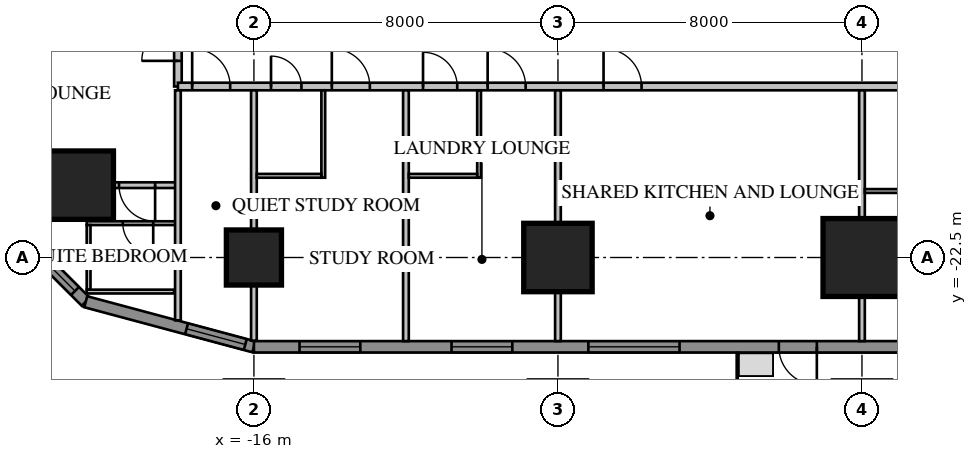
"""IFC4 building model, lengths in metres.
Left out: names, types, materials, properties, quantities, classifications, styles, units other than length and angle.
Written with IfcOpenShell. Run it as: python <this file> out.ifc"""

import sys

from ifc_helpers import new_model, si_unit, direction, frame, frame_2d, origin, origin_2d, place, context, subcontext, project, spatial, rectangle, extrude, element, fill, save


model = new_model("IFC4")
c1 = context("Model", 3, precision=1e-05, world=origin(), true_north=direction((0.0, 1.0)))
c2 = subcontext(c1, "Body", "Model", "MODEL_VIEW")
j1 = project(units=[si_unit("LENGTHUNIT", "METRE"), si_unit("PLANEANGLEUNIT", "RADIAN")], contexts=[c1])
p1 = place(None, origin())
s1 = spatial("IfcSite", under=j1, at=p1, CompositionType="ELEMENT")
p2 = place(p1, origin())
s2 = spatial("IfcBuilding", under=s1, at=p2, CompositionType="ELEMENT")
p3 = place(p2, frame((0.0, 0.0, 27.55)))
s3 = spatial("IfcBuildingStorey", under=s2, at=p3, CompositionType="ELEMENT", Elevation=27.55)
p4 = place(p3, frame((-20.596, -20.596, 0.0), z_axis=(0.0, 0.0, 1.0), x_axis=(1.0, 0.0, 0.0)))
e1 = element("IfcColumn", 1, at=p4, inside=s3, PredefinedType="COLUMN", context=c2, shape_type="SweptSolid", body=[
    extrude(rectangle(XDim=1.8, YDim=1.8, at=origin_2d()), origin(), (0.0, 0.0, 1.0), 3.85),
])
p5 = place(p3, frame((-16.0, -22.5, 0.0), z_axis=(0.0, 0.0, 1.0), x_axis=(1.0, 0.0, 0.0)))
e2 = element("IfcColumn", 2, at=p5, inside=s3, PredefinedType="COLUMN", context=c2, shape_type="SweptSolid", body=[
    extrude(rectangle(XDim=1.45, YDim=1.45, at=origin_2d()), origin(), (0.0, 0.0, 1.0), 3.85),
])
p6 = place(p3, frame((-8.0, -22.5, 0.0), z_axis=(0.0, 0.0, 1.0), x_axis=(1.0, 0.0, 0.0)))
e3 = element("IfcColumn", 3, at=p6, inside=s3, PredefinedType="COLUMN", context=c2, shape_type="SweptSolid", body=[
    extrude(rectangle(XDim=1.8, YDim=1.8, at=origin_2d()), origin(), (0.0, 0.0, 1.0), 3.85),
])
p7 = place(p3, frame((0.0, -22.5, 0.0), z_axis=(0.0, 0.0, 1.0), x_axis=(1.0, 0.0, 0.0)))
e4 = element("IfcColumn", 4, at=p7, inside=s3, PredefinedType="COLUMN", context=c2, shape_type="SweptSolid", body=[
    extrude(rectangle(XDim=2.05, YDim=2.05, at=origin_2d()), origin(), (0.0, 0.0, 1.0), 3.85),
])
p8 = place(p3, frame((-23.664, -20.425, 0.0), z_axis=(0.0, 0.0, 1.0), x_axis=(0.707106781187, -0.707106781187, 0.0)))
e5 = element("IfcWall", 5, at=p8, inside=s3, PredefinedType="SOLIDWALL", context=c2, shape_type="SweptSolid", body=[
    extrude(rectangle(XDim=4.581, YDim=0.3, at=frame_2d((2.291, 0.0))), origin(), (0.0, 0.0, 1.0), 3.65),
])
p9 = place(p8, frame((0.4, 0.0, 0.75)))
e6 = element("IfcOpeningElement", 6, at=p9, cuts=e5, PredefinedType="OPENING", context=c2, shape_type="SweptSolid", body=[
    extrude(rectangle(XDim=3.781, YDim=1.8, at=frame_2d((1.891, 0.9))), frame((0.0, 0.17, 0.0), z_axis=(0.0, -1.0, 0.0), x_axis=(1.0, 0.0, 0.0)), (0.0, 0.0, 1.0), 0.34),
])
p10 = place(p3, frame((-20.425, -23.664, 0.0), z_axis=(0.0, 0.0, 1.0), x_axis=(0.965920218567, -0.258839972501, 0.0)))
e7 = element("IfcWall", 7, at=p10, inside=s3, PredefinedType="SOLIDWALL", context=c2, shape_type="SweptSolid", body=[
    extrude(rectangle(XDim=4.581, YDim=0.3, at=frame_2d((2.291, 0.0))), origin(), (0.0, 0.0, 1.0), 3.65),
])
p11 = place(p10, frame((2.746, 0.0, 0.75)))
e8 = element("IfcOpeningElement", 8, at=p11, cuts=e7, PredefinedType="OPENING", context=c2, shape_type="SweptSolid", body=[
    extrude(rectangle(XDim=1.6, YDim=1.8, at=frame_2d((0.8, 0.9))), frame((0.0, 0.17, 0.0), z_axis=(0.0, -1.0, 0.0), x_axis=(1.0, 0.0, 0.0)), (0.0, 0.0, 1.0), 0.34),
])
p12 = place(p3, frame((-16.0, -24.85, 0.0), z_axis=(0.0, 0.0, 1.0), x_axis=(1.0, 0.0, 0.0)))
e9 = element("IfcWall", 9, at=p12, inside=s3, PredefinedType="SOLIDWALL", context=c2, shape_type="SweptSolid", body=[
    extrude(rectangle(XDim=32.0, YDim=0.3, at=frame_2d((16.0, 0.0))), origin(), (0.0, 0.0, 1.0), 3.65),
])
p13 = place(p12, frame((1.2, 0.0, 0.75)))
e10 = element("IfcOpeningElement", 10, at=p13, cuts=e9, PredefinedType="OPENING", context=c2, shape_type="SweptSolid", body=[
    extrude(rectangle(XDim=1.6, YDim=1.8, at=frame_2d((0.8, 0.9))), frame((0.0, 0.17, 0.0), z_axis=(0.0, -1.0, 0.0), x_axis=(1.0, 0.0, 0.0)), (0.0, 0.0, 1.0), 0.34),
])
p14 = place(p12, frame((5.2, 0.0, 0.75)))
e11 = element("IfcOpeningElement", 11, at=p14, cuts=e9, PredefinedType="OPENING", context=c2, shape_type="SweptSolid", body=[
    extrude(rectangle(XDim=1.6, YDim=1.8, at=frame_2d((0.8, 0.9))), frame((0.0, 0.17, 0.0), z_axis=(0.0, -1.0, 0.0), x_axis=(1.0, 0.0, 0.0)), (0.0, 0.0, 1.0), 0.34),
])
p15 = place(p12, frame((17.2, 0.0, 0.75)))
e12 = element("IfcOpeningElement", 12, at=p15, cuts=e9, PredefinedType="OPENING", context=c2, shape_type="SweptSolid", body=[
    extrude(rectangle(XDim=1.6, YDim=1.8, at=frame_2d((0.8, 0.9))), frame((0.0, 0.17, 0.0), z_axis=(0.0, -1.0, 0.0), x_axis=(1.0, 0.0, 0.0)), (0.0, 0.0, 1.0), 0.34),
])
p16 = place(p12, frame((21.2, 0.0, 0.75)))
e13 = element("IfcOpeningElement", 13, at=p16, cuts=e9, PredefinedType="OPENING", context=c2, shape_type="SweptSolid", body=[
    extrude(rectangle(XDim=1.6, YDim=1.8, at=frame_2d((0.8, 0.9))), frame((0.0, 0.17, 0.0), z_axis=(0.0, -1.0, 0.0), x_axis=(1.0, 0.0, 0.0)), (0.0, 0.0, 1.0), 0.34),
])
p17 = place(p12, frame((25.2, 0.0, 0.75)))
e14 = element("IfcOpeningElement", 14, at=p17, cuts=e9, PredefinedType="OPENING", context=c2, shape_type="SweptSolid", body=[
    extrude(rectangle(XDim=1.6, YDim=1.8, at=frame_2d((0.8, 0.9))), frame((0.0, 0.17, 0.0), z_axis=(0.0, -1.0, 0.0), x_axis=(1.0, 0.0, 0.0)), (0.0, 0.0, 1.0), 0.34),
])
p18 = place(p12, frame((29.2, 0.0, 0.75)))
e15 = element("IfcOpeningElement", 15, at=p18, cuts=e9, PredefinedType="OPENING", context=c2, shape_type="SweptSolid", body=[
    extrude(rectangle(XDim=1.6, YDim=1.8, at=frame_2d((0.8, 0.9))), frame((0.0, 0.17, 0.0), z_axis=(0.0, -1.0, 0.0), x_axis=(1.0, 0.0, 0.0)), (0.0, 0.0, 1.0), 0.34),
])
p19 = place(p12, frame((8.8, 0.0, 0.75)))
e16 = element("IfcOpeningElement", 16, at=p19, cuts=e9, PredefinedType="OPENING", context=c2, shape_type="SweptSolid", body=[
    extrude(rectangle(XDim=2.4, YDim=1.8, at=frame_2d((1.2, 0.9))), frame((0.0, 0.17, 0.0), z_axis=(0.0, -1.0, 0.0), x_axis=(1.0, 0.0, 0.0)), (0.0, 0.0, 1.0), 0.34),
])
p20 = place(p12, frame((13.812, 0.0, 0.0)))
e17 = element("IfcOpeningElement", 17, at=p20, cuts=e9, PredefinedType="OPENING", context=c2, shape_type="SweptSolid", body=[
    extrude(rectangle(XDim=1.0, YDim=2.4, at=frame_2d((0.5, 1.2))), frame((0.0, 0.17, 0.0), z_axis=(0.0, -1.0, 0.0), x_axis=(1.0, 0.0, 0.0)), (0.0, 0.0, 1.0), 0.34),
])
p21 = place(p3, frame((-18.0, 18.0, 0.0), z_axis=(0.0, 0.0, 1.0), x_axis=(0.0, -1.0, 0.0)))
e18 = element("IfcWall", 18, at=p21, inside=s3, PredefinedType="PARTITIONING", context=c2, shape_type="SweptSolid", body=[
    extrude(rectangle(XDim=36.0, YDim=0.2, at=frame_2d((18.0, 0.0))), origin(), (0.0, 0.0, 1.0), 3.65),
])
p22 = place(p21, frame((10.4, 0.0, 0.0)))
e19 = element("IfcOpeningElement", 19, at=p22, cuts=e18, PredefinedType="OPENING", context=c2, shape_type="SweptSolid", body=[
    extrude(rectangle(XDim=1.0, YDim=2.1, at=frame_2d((0.5, 1.05))), frame((0.0, 0.12, 0.0), z_axis=(0.0, -1.0, 0.0), x_axis=(1.0, 0.0, 0.0)), (0.0, 0.0, 1.0), 0.24),
])
p23 = place(p21, frame((14.4, 0.0, 0.0)))
e20 = element("IfcOpeningElement", 20, at=p23, cuts=e18, PredefinedType="OPENING", context=c2, shape_type="SweptSolid", body=[
    extrude(rectangle(XDim=1.0, YDim=2.1, at=frame_2d((0.5, 1.05))), frame((0.0, 0.12, 0.0), z_axis=(0.0, -1.0, 0.0), x_axis=(1.0, 0.0, 0.0)), (0.0, 0.0, 1.0), 0.24),
])
p24 = place(p21, frame((0.375, 0.0, 0.0)))
e21 = element("IfcOpeningElement", 21, at=p24, cuts=e18, PredefinedType="OPENING", context=c2, shape_type="SweptSolid", body=[
    extrude(rectangle(XDim=1.0, YDim=2.1, at=frame_2d((0.5, 1.05))), frame((0.0, 0.12, 0.0), z_axis=(0.0, -1.0, 0.0), x_axis=(1.0, 0.0, 0.0)), (0.0, 0.0, 1.0), 0.24),
])
p25 = place(p21, frame((34.375, 0.0, 0.0)))
e22 = element("IfcOpeningElement", 22, at=p25, cuts=e18, PredefinedType="OPENING", context=c2, shape_type="SweptSolid", body=[
    extrude(rectangle(XDim=0.95, YDim=2.1, at=frame_2d((0.475, 1.05))), frame((0.0, 0.12, 0.0), z_axis=(0.0, -1.0, 0.0), x_axis=(1.0, 0.0, 0.0)), (0.0, 0.0, 1.0), 0.24),
])
p26 = place(p3, frame((-18.065, -21.596, 0.0), z_axis=(0.0, 0.0, 1.0), x_axis=(-1.0, 0.0, 0.0)))
e23 = element("IfcWall", 23, at=p26, inside=s3, PredefinedType="PARTITIONING", context=c2, shape_type="SweptSolid", body=[
    extrude(rectangle(XDim=2.335, YDim=0.1, at=frame_2d((1.167, 0.0))), origin(), (0.0, 0.0, 1.0), 3.65),
])
p27 = place(p26, frame((0.585, 0.0, 0.0)))
e24 = element("IfcOpeningElement", 24, at=p27, cuts=e23, PredefinedType="OPENING", context=c2, shape_type="SweptSolid", body=[
    extrude(rectangle(XDim=0.8, YDim=2.1, at=frame_2d((0.4, 1.05))), frame((0.0, 0.07, 0.0), z_axis=(0.0, -1.0, 0.0), x_axis=(1.0, 0.0, 0.0)), (0.0, 0.0, 1.0), 0.14),
])
p28 = place(p3, frame((-20.35, -21.646, 0.0), z_axis=(0.0, 0.0, 1.0), x_axis=(0.0, -1.0, 0.0)))
e25 = element("IfcWall", 25, at=p28, inside=s3, PredefinedType="PARTITIONING", context=c2, shape_type="SweptSolid", body=[
    extrude(rectangle(XDim=1.7, YDim=0.1, at=frame_2d((0.85, 0.0))), origin(), (0.0, 0.0, 1.0), 3.65),
])
p29 = place(p3, frame((-18.1, -23.396, 0.0), z_axis=(0.0, 0.0, 1.0), x_axis=(-1.0, 0.0, 0.0)))
e26 = element("IfcWall", 26, at=p29, inside=s3, PredefinedType="PARTITIONING", context=c2, shape_type="SweptSolid", body=[
    extrude(rectangle(XDim=2.3, YDim=0.1, at=frame_2d((1.15, 0.0))), origin(), (0.0, 0.0, 1.0), 3.65),
])
p30 = place(p3, frame((-18.065, -20.596, 0.0), z_axis=(0.0, 0.0, 1.0), x_axis=(-1.0, 0.0, 0.0)))
e27 = element("IfcWall", 27, at=p30, inside=s3, PredefinedType="PARTITIONING", context=c2, shape_type="SweptSolid", body=[
    extrude(rectangle(XDim=5.209, YDim=0.15, at=frame_2d((2.604, 0.0))), origin(), (0.0, 0.0, 1.0), 3.65),
])
p31 = place(p30, frame((0.535, 0.0, 0.0)))
e28 = element("IfcOpeningElement", 28, at=p31, cuts=e27, PredefinedType="OPENING", context=c2, shape_type="SweptSolid", body=[
    extrude(rectangle(XDim=0.95, YDim=2.1, at=frame_2d((0.475, 1.05))), frame((0.0, 0.095, 0.0), z_axis=(0.0, -1.0, 0.0), x_axis=(1.0, 0.0, 0.0)), (0.0, 0.0, 1.0), 0.19),
])
p32 = place(p3, frame((-18.0, -18.0, 0.0), z_axis=(0.0, 0.0, 1.0), x_axis=(1.0, 0.0, 0.0)))
e29 = element("IfcWall", 29, at=p32, inside=s3, PredefinedType="PARTITIONING", context=c2, shape_type="SweptSolid", body=[
    extrude(rectangle(XDim=36.0, YDim=0.2, at=frame_2d((18.0, 0.0))), origin(), (0.0, 0.0, 1.0), 3.65),
])
p33 = place(p32, frame((0.375, 0.0, 0.0)))
e30 = element("IfcOpeningElement", 30, at=p33, cuts=e29, PredefinedType="OPENING", context=c2, shape_type="SweptSolid", body=[
    extrude(rectangle(XDim=1.0, YDim=2.1, at=frame_2d((0.5, 1.05))), frame((0.0, 0.12, 0.0), z_axis=(0.0, -1.0, 0.0), x_axis=(1.0, 0.0, 0.0)), (0.0, 0.0, 1.0), 0.24),
])
p34 = place(p32, frame((2.45, 0.0, 0.0)))
e31 = element("IfcOpeningElement", 31, at=p34, cuts=e29, PredefinedType="OPENING", context=c2, shape_type="SweptSolid", body=[
    extrude(rectangle(XDim=0.8, YDim=2.1, at=frame_2d((0.4, 1.05))), frame((0.0, 0.12, 0.0), z_axis=(0.0, -1.0, 0.0), x_axis=(1.0, 0.0, 0.0)), (0.0, 0.0, 1.0), 0.24),
])
p35 = place(p32, frame((4.05, 0.0, 0.0)))
e32 = element("IfcOpeningElement", 32, at=p35, cuts=e29, PredefinedType="OPENING", context=c2, shape_type="SweptSolid", body=[
    extrude(rectangle(XDim=1.0, YDim=2.1, at=frame_2d((0.5, 1.05))), frame((0.0, 0.12, 0.0), z_axis=(0.0, -1.0, 0.0), x_axis=(1.0, 0.0, 0.0)), (0.0, 0.0, 1.0), 0.24),
])
p36 = place(p32, frame((6.45, 0.0, 0.0)))
e33 = element("IfcOpeningElement", 33, at=p36, cuts=e29, PredefinedType="OPENING", context=c2, shape_type="SweptSolid", body=[
    extrude(rectangle(XDim=0.9, YDim=2.1, at=frame_2d((0.45, 1.05))), frame((0.0, 0.12, 0.0), z_axis=(0.0, -1.0, 0.0), x_axis=(1.0, 0.0, 0.0)), (0.0, 0.0, 1.0), 0.24),
])
p37 = place(p32, frame((8.15, 0.0, 0.0)))
e34 = element("IfcOpeningElement", 34, at=p37, cuts=e29, PredefinedType="OPENING", context=c2, shape_type="SweptSolid", body=[
    extrude(rectangle(XDim=1.0, YDim=2.1, at=frame_2d((0.5, 1.05))), frame((0.0, 0.12, 0.0), z_axis=(0.0, -1.0, 0.0), x_axis=(1.0, 0.0, 0.0)), (0.0, 0.0, 1.0), 0.24),
])
p38 = place(p32, frame((19.8, 0.0, 0.0)))
e35 = element("IfcOpeningElement", 35, at=p38, cuts=e29, PredefinedType="OPENING", context=c2, shape_type="SweptSolid", body=[
    extrude(rectangle(XDim=0.95, YDim=2.1, at=frame_2d((0.475, 1.05))), frame((0.0, 0.12, 0.0), z_axis=(0.0, -1.0, 0.0), x_axis=(1.0, 0.0, 0.0)), (0.0, 0.0, 1.0), 0.24),
])
p39 = place(p32, frame((23.8, 0.0, 0.0)))
e36 = element("IfcOpeningElement", 36, at=p39, cuts=e29, PredefinedType="OPENING", context=c2, shape_type="SweptSolid", body=[
    extrude(rectangle(XDim=0.95, YDim=2.1, at=frame_2d((0.475, 1.05))), frame((0.0, 0.12, 0.0), z_axis=(0.0, -1.0, 0.0), x_axis=(1.0, 0.0, 0.0)), (0.0, 0.0, 1.0), 0.24),
])
p40 = place(p32, frame((27.8, 0.0, 0.0)))
e37 = element("IfcOpeningElement", 37, at=p40, cuts=e29, PredefinedType="OPENING", context=c2, shape_type="SweptSolid", body=[
    extrude(rectangle(XDim=0.95, YDim=2.1, at=frame_2d((0.475, 1.05))), frame((0.0, 0.12, 0.0), z_axis=(0.0, -1.0, 0.0), x_axis=(1.0, 0.0, 0.0)), (0.0, 0.0, 1.0), 0.24),
])
p41 = place(p32, frame((31.8, 0.0, 0.0)))
e38 = element("IfcOpeningElement", 38, at=p41, cuts=e29, PredefinedType="OPENING", context=c2, shape_type="SweptSolid", body=[
    extrude(rectangle(XDim=0.95, YDim=2.1, at=frame_2d((0.475, 1.05))), frame((0.0, 0.12, 0.0), z_axis=(0.0, -1.0, 0.0), x_axis=(1.0, 0.0, 0.0)), (0.0, 0.0, 1.0), 0.24),
])
p42 = place(p32, frame((34.375, 0.0, 0.0)))
e39 = element("IfcOpeningElement", 39, at=p42, cuts=e29, PredefinedType="OPENING", context=c2, shape_type="SweptSolid", body=[
    extrude(rectangle(XDim=0.95, YDim=2.1, at=frame_2d((0.475, 1.05))), frame((0.0, 0.12, 0.0), z_axis=(0.0, -1.0, 0.0), x_axis=(1.0, 0.0, 0.0)), (0.0, 0.0, 1.0), 0.24),
])
p43 = place(p32, frame((11.2, 0.0, 0.0)))
e40 = element("IfcOpeningElement", 40, at=p43, cuts=e29, PredefinedType="OPENING", context=c2, shape_type="SweptSolid", body=[
    extrude(rectangle(XDim=1.0, YDim=2.1, at=frame_2d((0.5, 1.05))), frame((0.0, 0.12, 0.0), z_axis=(0.0, -1.0, 0.0), x_axis=(1.0, 0.0, 0.0)), (0.0, 0.0, 1.0), 0.24),
])
p44 = place(p3, frame((-18.0, -18.1, 0.0), z_axis=(0.0, 0.0, 1.0), x_axis=(0.0, -1.0, 0.0)))
e41 = element("IfcWall", 41, at=p44, inside=s3, PredefinedType="PARTITIONING", context=c2, shape_type="SweptSolid", body=[
    extrude(rectangle(XDim=6.053, YDim=0.15, at=frame_2d((3.027, 0.0))), origin(), (0.0, 0.0, 1.0), 3.65),
])
p45 = place(p3, frame((-16.0, -18.1, 0.0), z_axis=(0.0, 0.0, 1.0), x_axis=(0.0, -1.0, 0.0)))
e42 = element("IfcWall", 42, at=p45, inside=s3, PredefinedType="PARTITIONING", context=c2, shape_type="SweptSolid", body=[
    extrude(rectangle(XDim=6.589, YDim=0.15, at=frame_2d((3.295, 0.0))), origin(), (0.0, 0.0, 1.0), 3.65),
])
for number, where, z_axis, x_axis in (
    (43, (-12.0, -18.1, 0.0), (0.0, 0.0, 1.0), (0.0, -1.0, 0.0)),
    (44, (-8.0, -18.1, 0.0), (0.0, 0.0, 1.0), (0.0, -1.0, 0.0)),
):
    element("IfcWall", number, at=place(p3, frame(where, z_axis=z_axis, x_axis=x_axis)), inside=s3, PredefinedType="PARTITIONING", context=c2, shape_type="SweptSolid", body=[
        extrude(rectangle(XDim=6.6, YDim=0.15, at=frame_2d((3.3, 0.0))), origin(), (0.0, 0.0, 1.0), 3.65),
    ])
p46 = place(p3, frame((0.0, -18.1, 0.0), z_axis=(0.0, 0.0, 1.0), x_axis=(0.0, -1.0, 0.0)))
e45 = element("IfcWall", 45, at=p46, inside=s3, PredefinedType="PARTITIONING", context=c2, shape_type="SweptSolid", body=[
    extrude(rectangle(XDim=6.6, YDim=0.15, at=frame_2d((3.3, 0.0))), origin(), (0.0, 0.0, 1.0), 2.809),
])
p47 = place(p3, frame((-14.175, -18.1, 0.0), z_axis=(0.0, 0.0, 1.0), x_axis=(0.0, -1.0, 0.0)))
e46 = element("IfcWall", 46, at=p47, inside=s3, PredefinedType="PARTITIONING", context=c2, shape_type="SweptSolid", body=[
    extrude(rectangle(XDim=2.3, YDim=0.1, at=frame_2d((1.15, 0.0))), origin(), (0.0, 0.0, 1.0), 3.65),
])
p48 = place(p3, frame((-15.925, -20.35, 0.0), z_axis=(0.0, 0.0, 1.0), x_axis=(1.0, 0.0, 0.0)))
e47 = element("IfcWall", 47, at=p48, inside=s3, PredefinedType="PARTITIONING", context=c2, shape_type="SweptSolid", body=[
    extrude(rectangle(XDim=1.7, YDim=0.1, at=frame_2d((0.85, 0.0))), origin(), (0.0, 0.0, 1.0), 3.65),
])
p49 = place(p3, frame((-10.075, -18.1, 0.0), z_axis=(0.0, 0.0, 1.0), x_axis=(0.0, -1.0, 0.0)))
e48 = element("IfcWall", 48, at=p49, inside=s3, PredefinedType="PARTITIONING", context=c2, shape_type="SweptSolid", body=[
    extrude(rectangle(XDim=2.3, YDim=0.1, at=frame_2d((1.15, 0.0))), origin(), (0.0, 0.0, 1.0), 3.65),
])
p50 = place(p3, frame((-11.925, -20.35, 0.0), z_axis=(0.0, 0.0, 1.0), x_axis=(1.0, 0.0, 0.0)))
e49 = element("IfcWall", 49, at=p50, inside=s3, PredefinedType="PARTITIONING", context=c2, shape_type="SweptSolid", body=[
    extrude(rectangle(XDim=1.8, YDim=0.1, at=frame_2d((0.9, 0.0))), origin(), (0.0, 0.0, 1.0), 3.65),
])
p51 = place(p3, frame((0.075, -20.75, 0.0), z_axis=(0.0, 0.0, 1.0), x_axis=(1.0, 0.0, 0.0)))
e50 = element("IfcWall", 50, at=p51, inside=s3, PredefinedType="PARTITIONING", context=c2, shape_type="SweptSolid", body=[
    extrude(rectangle(XDim=1.45, YDim=0.1, at=frame_2d((0.725, 0.0))), origin(), (0.0, 0.0, 1.0), 3.65),
])
p52 = place(p9, origin())
e51 = element("IfcWindow", 51, at=p52, inside=s3, PartitioningType="SINGLE_PANEL", PredefinedType="WINDOW", context=c2, shape_type="SweptSolid", body=[
    extrude(rectangle(XDim=3.781, YDim=1.8, at=frame_2d((1.891, 0.9))), frame((0.0, 0.03, 0.0), z_axis=(0.0, -1.0, 0.0), x_axis=(1.0, 0.0, 0.0)), (0.0, 0.0, 1.0), 0.06),
])
fill(e6, e51)
p53 = place(p11, origin())
e52 = element("IfcWindow", 52, at=p53, inside=s3, PartitioningType="SINGLE_PANEL", PredefinedType="WINDOW", context=c2, shape_type="SweptSolid", body=[
    extrude(rectangle(XDim=1.6, YDim=1.8, at=frame_2d((0.8, 0.9))), frame((0.0, 0.03, 0.0), z_axis=(0.0, -1.0, 0.0), x_axis=(1.0, 0.0, 0.0)), (0.0, 0.0, 1.0), 0.06),
])
fill(e8, e52)
p54 = place(p13, origin())
e53 = element("IfcWindow", 53, at=p54, inside=s3, PartitioningType="SINGLE_PANEL", PredefinedType="WINDOW", context=c2, shape_type="SweptSolid", body=[
    extrude(rectangle(XDim=1.6, YDim=1.8, at=frame_2d((0.8, 0.9))), frame((0.0, 0.03, 0.0), z_axis=(0.0, -1.0, 0.0), x_axis=(1.0, 0.0, 0.0)), (0.0, 0.0, 1.0), 0.06),
])
fill(e10, e53)
p55 = place(p14, origin())
e54 = element("IfcWindow", 54, at=p55, inside=s3, PartitioningType="SINGLE_PANEL", PredefinedType="WINDOW", context=c2, shape_type="SweptSolid", body=[
    extrude(rectangle(XDim=1.6, YDim=1.8, at=frame_2d((0.8, 0.9))), frame((0.0, 0.03, 0.0), z_axis=(0.0, -1.0, 0.0), x_axis=(1.0, 0.0, 0.0)), (0.0, 0.0, 1.0), 0.06),
])
fill(e11, e54)
p56 = place(p19, origin())
e55 = element("IfcWindow", 55, at=p56, inside=s3, PartitioningType="SINGLE_PANEL", PredefinedType="WINDOW", context=c2, shape_type="SweptSolid", body=[
    extrude(rectangle(XDim=2.4, YDim=1.8, at=frame_2d((1.2, 0.9))), frame((0.0, 0.03, 0.0), z_axis=(0.0, -1.0, 0.0), x_axis=(1.0, 0.0, 0.0)), (0.0, 0.0, 1.0), 0.06),
])
fill(e16, e55)
p57 = place(p20, origin())
e56 = element("IfcDoor", 56, at=p57, inside=s3, OperationType="SINGLE_SWING_RIGHT", PredefinedType="DOOR", context=c2, shape_type="SweptSolid", body=[
    extrude(rectangle(XDim=1.0, YDim=2.4, at=frame_2d((0.5, 1.2))), frame((0.0, 0.025, 0.0), z_axis=(0.0, -1.0, 0.0), x_axis=(1.0, 0.0, 0.0)), (0.0, 0.0, 1.0), 0.05),
])
fill(e17, e56)
p58 = place(p25, origin())
e57 = element("IfcDoor", 57, at=p58, inside=s3, OperationType="SINGLE_SWING_RIGHT", PredefinedType="DOOR", context=c2, shape_type="SweptSolid", body=[
    extrude(rectangle(XDim=0.95, YDim=2.1, at=frame_2d((0.475, 1.05))), frame((0.0, 0.025, 0.0), z_axis=(0.0, -1.0, 0.0), x_axis=(1.0, 0.0, 0.0)), (0.0, 0.0, 1.0), 0.05),
])
fill(e22, e57)
p59 = place(p27, origin())
e58 = element("IfcDoor", 58, at=p59, inside=s3, OperationType="SINGLE_SWING_LEFT", PredefinedType="DOOR", context=c2, shape_type="SweptSolid", body=[
    extrude(rectangle(XDim=0.8, YDim=2.1, at=frame_2d((0.4, 1.05))), frame((0.0, 0.025, 0.0), z_axis=(0.0, -1.0, 0.0), x_axis=(1.0, 0.0, 0.0)), (0.0, 0.0, 1.0), 0.05),
])
fill(e24, e58)
p60 = place(p31, origin())
e59 = element("IfcDoor", 59, at=p60, inside=s3, OperationType="SINGLE_SWING_LEFT", PredefinedType="DOOR", context=c2, shape_type="SweptSolid", body=[
    extrude(rectangle(XDim=0.95, YDim=2.1, at=frame_2d((0.475, 1.05))), frame((0.0, 0.025, 0.0), z_axis=(0.0, -1.0, 0.0), x_axis=(1.0, 0.0, 0.0)), (0.0, 0.0, 1.0), 0.05),
])
fill(e28, e59)
p61 = place(p33, origin())
e60 = element("IfcDoor", 60, at=p61, inside=s3, OperationType="SINGLE_SWING_LEFT", PredefinedType="DOOR", context=c2, shape_type="SweptSolid", body=[
    extrude(rectangle(XDim=1.0, YDim=2.1, at=frame_2d((0.5, 1.05))), frame((0.0, 0.025, 0.0), z_axis=(0.0, -1.0, 0.0), x_axis=(1.0, 0.0, 0.0)), (0.0, 0.0, 1.0), 0.05),
])
fill(e30, e60)
p62 = place(p34, origin())
e61 = element("IfcDoor", 61, at=p62, inside=s3, OperationType="SINGLE_SWING_LEFT", PredefinedType="DOOR", context=c2, shape_type="SweptSolid", body=[
    extrude(rectangle(XDim=0.8, YDim=2.1, at=frame_2d((0.4, 1.05))), frame((0.0, 0.025, 0.0), z_axis=(0.0, -1.0, 0.0), x_axis=(1.0, 0.0, 0.0)), (0.0, 0.0, 1.0), 0.05),
])
fill(e31, e61)
p63 = place(p35, origin())
e62 = element("IfcDoor", 62, at=p63, inside=s3, OperationType="SINGLE_SWING_LEFT", PredefinedType="DOOR", context=c2, shape_type="SweptSolid", body=[
    extrude(rectangle(XDim=1.0, YDim=2.1, at=frame_2d((0.5, 1.05))), frame((0.0, 0.025, 0.0), z_axis=(0.0, -1.0, 0.0), x_axis=(1.0, 0.0, 0.0)), (0.0, 0.0, 1.0), 0.05),
])
fill(e32, e62)
p64 = place(p36, origin())
e63 = element("IfcDoor", 63, at=p64, inside=s3, OperationType="SINGLE_SWING_LEFT", PredefinedType="DOOR", context=c2, shape_type="SweptSolid", body=[
    extrude(rectangle(XDim=0.9, YDim=2.1, at=frame_2d((0.45, 1.05))), frame((0.0, 0.025, 0.0), z_axis=(0.0, -1.0, 0.0), x_axis=(1.0, 0.0, 0.0)), (0.0, 0.0, 1.0), 0.05),
])
fill(e33, e63)
p65 = place(p37, origin())
e64 = element("IfcDoor", 64, at=p65, inside=s3, OperationType="SINGLE_SWING_LEFT", PredefinedType="DOOR", context=c2, shape_type="SweptSolid", body=[
    extrude(rectangle(XDim=1.0, YDim=2.1, at=frame_2d((0.5, 1.05))), frame((0.0, 0.025, 0.0), z_axis=(0.0, -1.0, 0.0), x_axis=(1.0, 0.0, 0.0)), (0.0, 0.0, 1.0), 0.05),
])
fill(e34, e64)
p66 = place(p43, origin())
e65 = element("IfcDoor", 65, at=p66, inside=s3, OperationType="SINGLE_SWING_LEFT", PredefinedType="DOOR", context=c2, shape_type="SweptSolid", body=[
    extrude(rectangle(XDim=1.0, YDim=2.1, at=frame_2d((0.5, 1.05))), frame((0.0, 0.025, 0.0), z_axis=(0.0, -1.0, 0.0), x_axis=(1.0, 0.0, 0.0)), (0.0, 0.0, 1.0), 0.05),
])
fill(e40, e65)
save(model, sys.argv[1])
